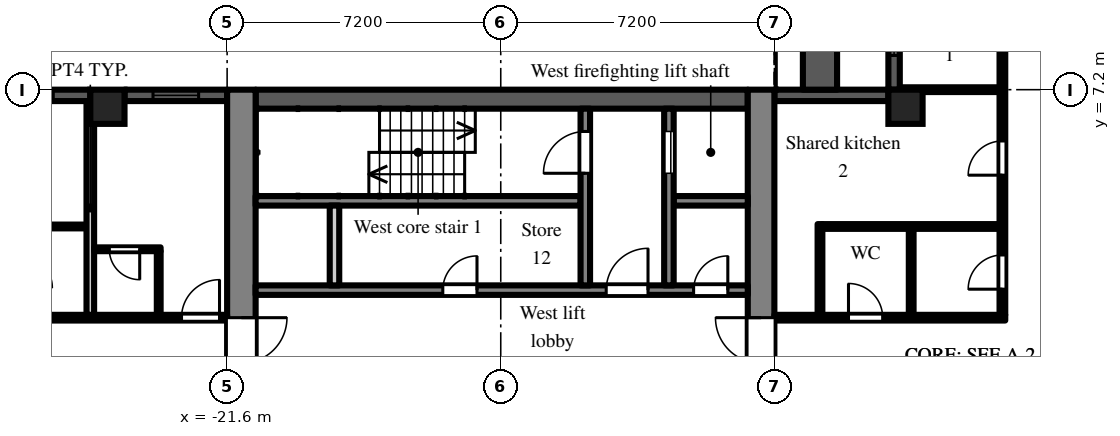
"""IFC4 building model, lengths in metres.
Left out: names, types, materials, properties, quantities, classifications, styles, units other than length and angle.
Written with IfcOpenShell. Run it as: python <this file> out.ifc"""

import sys

from ifc_helpers import new_model, si_unit, direction, frame, frame_2d, origin, origin_2d, place, context, subcontext, project, spatial, rectangle, extrude, element, fill, save


model = new_model("IFC4")
c1 = context("Model", 3, precision=1e-05, world=origin(), true_north=direction((0.0, 1.0)))
c2 = subcontext(c1, "Body", "Model", "MODEL_VIEW")
j1 = project(units=[si_unit("LENGTHUNIT", "METRE"), si_unit("PLANEANGLEUNIT", "RADIAN")], contexts=[c1])
p1 = place(None, origin())
s1 = spatial("IfcSite", under=j1, at=p1, CompositionType="ELEMENT")
p2 = place(p1, origin())
s2 = spatial("IfcBuilding", under=s1, at=p2, CompositionType="ELEMENT")
p3 = place(p2, frame((0.0, 0.0, 69.9)))
s3 = spatial("IfcBuildingStorey", under=s2, at=p3, CompositionType="ELEMENT", Elevation=69.9)
for number, where, z_axis, x_axis in (
    (1, (-24.75, 6.75, 0.0), (0.0, 0.0, 1.0), (1.0, 0.0, 0.0)),
    (2, (-3.75, 6.75, 0.0), (0.0, 0.0, 1.0), (1.0, 0.0, 0.0)),
):
    element("IfcColumn", number, at=place(p3, frame(where, z_axis=z_axis, x_axis=x_axis)), inside=s3, PredefinedType="COLUMN", context=c2, shape_type="SweptSolid", body=[
        extrude(rectangle(XDim=0.9, YDim=0.9, at=origin_2d()), origin(), (0.0, 0.0, 1.0), 3.0),
    ])
p4 = place(p3, frame((-4.05, 14.4, 0.0), z_axis=(0.0, 0.0, 1.0), x_axis=(0.0, -1.0, 0.0)))
e3 = element("IfcWall", 3, at=p4, inside=s3, PredefinedType="SOLIDWALL", context=c2, shape_type="SweptSolid", body=[
    extrude(rectangle(XDim=7.2, YDim=0.3, at=frame_2d((3.6, 0.0))), origin(), (0.0, 0.0, 1.0), 2.1),
])
p5 = place(p4, frame((3.0, 0.0, 0.0)))
e4 = element("IfcOpeningElement", 4, at=p5, cuts=e3, PredefinedType="OPENING", context=c2, shape_type="SweptSolid", body=[
    extrude(rectangle(XDim=1.2, YDim=2.05, at=frame_2d((0.6, 1.025))), frame((0.0, 0.16, 0.0), z_axis=(0.0, -1.0, 0.0), x_axis=(1.0, 0.0, 0.0)), (0.0, 0.0, 1.0), 0.32),
])
p6 = place(p4, frame((0.9, 0.0, 0.2)))
e5 = element("IfcOpeningElement", 5, at=p6, cuts=e3, PredefinedType="OPENING", context=c2, shape_type="SweptSolid", body=[
    extrude(rectangle(XDim=1.8, YDim=1.85, at=frame_2d((0.9, 0.925))), frame((0.0, 0.16, 0.0), z_axis=(0.0, -1.0, 0.0), x_axis=(1.0, 0.0, 0.0)), (0.0, 0.0, 1.0), 0.32),
])
p7 = place(p4, frame((4.5, 0.0, 0.2)))
e6 = element("IfcOpeningElement", 6, at=p7, cuts=e3, PredefinedType="OPENING", context=c2, shape_type="SweptSolid", body=[
    extrude(rectangle(XDim=1.8, YDim=1.85, at=frame_2d((0.9, 0.925))), frame((0.0, 0.16, 0.0), z_axis=(0.0, -1.0, 0.0), x_axis=(1.0, 0.0, 0.0)), (0.0, 0.0, 1.0), 0.32),
])
p8 = place(p3, frame((-4.2, 7.05, 0.0), z_axis=(0.0, 0.0, 1.0), x_axis=(-1.0, 0.0, 0.0)))
e7 = element("IfcWall", 7, at=p8, inside=s3, PredefinedType="SOLIDWALL", context=c2, shape_type="SweptSolid", body=[
    extrude(rectangle(XDim=3.0, YDim=0.3, at=frame_2d((1.5, 0.0))), origin(), (0.0, 0.0, 1.0), 2.1),
])
p9 = place(p3, frame((-21.6, 7.05, 0.0), z_axis=(0.0, 0.0, 1.0), x_axis=(-1.0, 0.0, 0.0)))
e8 = element("IfcWall", 8, at=p9, inside=s3, PredefinedType="SOLIDWALL", context=c2, shape_type="SweptSolid", body=[
    extrude(rectangle(XDim=2.7, YDim=0.3, at=frame_2d((1.35, 0.0))), origin(), (0.0, 0.0, 1.0), 2.1),
])
p10 = place(p9, frame((0.75, 0.0, 0.2)))
e9 = element("IfcOpeningElement", 9, at=p10, cuts=e8, PredefinedType="OPENING", context=c2, shape_type="SweptSolid", body=[
    extrude(rectangle(XDim=1.2, YDim=1.85, at=frame_2d((0.6, 0.925))), frame((0.0, 0.16, 0.0), z_axis=(0.0, -1.0, 0.0), x_axis=(1.0, 0.0, 0.0)), (0.0, 0.0, 1.0), 0.32),
])
p11 = place(p3, frame((-25.2, 7.05, 0.0), z_axis=(0.0, 0.0, 1.0), x_axis=(-1.0, 0.0, 0.0)))
e10 = element("IfcWall", 10, at=p11, inside=s3, PredefinedType="SOLIDWALL", context=c2, shape_type="SweptSolid", body=[
    extrude(rectangle(XDim=3.15, YDim=0.3, at=frame_2d((1.575, 0.0))), origin(), (0.0, 0.0, 1.0), 2.1),
])
p12 = place(p11, frame((0.975, 0.0, 0.2)))
e11 = element("IfcOpeningElement", 11, at=p12, cuts=e10, PredefinedType="OPENING", context=c2, shape_type="SweptSolid", body=[
    extrude(rectangle(XDim=1.2, YDim=1.85, at=frame_2d((0.6, 0.925))), frame((0.0, 0.16, 0.0), z_axis=(0.0, -1.0, 0.0), x_axis=(1.0, 0.0, 0.0)), (0.0, 0.0, 1.0), 0.32),
])
p13 = place(p3, frame((-6.0, 7.2, 0.0), z_axis=(0.0, 0.0, 1.0), x_axis=(0.0, 1.0, 0.0)))
e12 = element("IfcWall", 12, at=p13, inside=s3, PredefinedType="PARAPET", context=c2, shape_type="SweptSolid", body=[
    extrude(rectangle(XDim=7.2, YDim=0.9, at=frame_2d((3.6, 0.0))), origin(), (0.0, 0.0, 1.0), 0.8),
])
p14 = place(p3, frame((-7.55, -7.2, 0.0), z_axis=(0.0, 0.0, 1.0), x_axis=(0.0, 1.0, 0.0)))
e13 = element("IfcWall", 13, at=p14, inside=s3, PredefinedType="SHEAR", context=c2, shape_type="SweptSolid", body=[
    extrude(rectangle(XDim=14.4, YDim=0.7, at=frame_2d((7.2, 0.0))), origin(), (0.0, 0.0, 1.0), 2.575),
])
p15 = place(p14, frame((6.0, 0.0, 0.0)))
e14 = element("IfcOpeningElement", 14, at=p15, cuts=e13, PredefinedType="OPENING", context=c2, shape_type="SweptSolid", body=[
    extrude(rectangle(XDim=2.4, YDim=2.2, at=frame_2d((1.2, 1.1))), frame((0.0, 0.36, 0.0), z_axis=(0.0, -1.0, 0.0), x_axis=(1.0, 0.0, 0.0)), (0.0, 0.0, 1.0), 0.72),
])
p16 = place(p3, frame((-21.225, -7.2, 0.0), z_axis=(0.0, 0.0, 1.0), x_axis=(0.0, 1.0, 0.0)))
e15 = element("IfcWall", 15, at=p16, inside=s3, PredefinedType="SHEAR", context=c2, shape_type="SweptSolid", body=[
    extrude(rectangle(XDim=14.4, YDim=0.75, at=frame_2d((7.2, 0.0))), origin(), (0.0, 0.0, 1.0), 2.575),
])
p17 = place(p16, frame((6.0, 0.0, 0.0)))
e16 = element("IfcOpeningElement", 16, at=p17, cuts=e15, PredefinedType="OPENING", context=c2, shape_type="SweptSolid", body=[
    extrude(rectangle(XDim=2.4, YDim=2.2, at=frame_2d((1.2, 1.1))), frame((0.0, 0.385, 0.0), z_axis=(0.0, -1.0, 0.0), x_axis=(1.0, 0.0, 0.0)), (0.0, 0.0, 1.0), 0.77),
])
p18 = place(p3, frame((-7.9, 6.95, 0.0), z_axis=(0.0, 0.0, 1.0), x_axis=(-1.0, 0.0, 0.0)))
e17 = element("IfcWall", 17, at=p18, inside=s3, PredefinedType="SHEAR", context=c2, shape_type="SweptSolid", body=[
    extrude(rectangle(XDim=12.95, YDim=0.5, at=frame_2d((6.475, 0.0))), origin(), (0.0, 0.0, 1.0), 2.575),
])
p19 = place(p3, frame((-7.9, 1.925, 0.0), z_axis=(0.0, 0.0, 1.0), x_axis=(-1.0, 0.0, 0.0)))
e18 = element("IfcWall", 18, at=p19, inside=s3, PredefinedType="SHEAR", context=c2, shape_type="SweptSolid", body=[
    extrude(rectangle(XDim=12.95, YDim=0.25, at=frame_2d((6.475, 0.0))), origin(), (0.0, 0.0, 1.0), 2.575),
])
p20 = place(p19, frame((0.525, 0.0, 0.0)))
e19 = element("IfcOpeningElement", 19, at=p20, cuts=e18, PredefinedType="OPENING", context=c2, shape_type="SweptSolid", body=[
    extrude(rectangle(XDim=0.9, YDim=2.1, at=frame_2d((0.45, 1.05))), frame((0.0, 0.135, 0.0), z_axis=(0.0, -1.0, 0.0), x_axis=(1.0, 0.0, 0.0)), (0.0, 0.0, 1.0), 0.27),
])
p21 = place(p19, frame((2.625, 0.0, 0.0)))
e20 = element("IfcOpeningElement", 20, at=p21, cuts=e18, PredefinedType="OPENING", context=c2, shape_type="SweptSolid", body=[
    extrude(rectangle(XDim=1.1, YDim=2.1, at=frame_2d((0.55, 1.05))), frame((0.0, 0.135, 0.0), z_axis=(0.0, -1.0, 0.0), x_axis=(1.0, 0.0, 0.0)), (0.0, 0.0, 1.0), 0.27),
])
p22 = place(p19, frame((7.125, 0.0, 0.0)))
e21 = element("IfcOpeningElement", 21, at=p22, cuts=e18, PredefinedType="OPENING", context=c2, shape_type="SweptSolid", body=[
    extrude(rectangle(XDim=0.9, YDim=2.1, at=frame_2d((0.45, 1.05))), frame((0.0, 0.135, 0.0), z_axis=(0.0, -1.0, 0.0), x_axis=(1.0, 0.0, 0.0)), (0.0, 0.0, 1.0), 0.27),
])
p23 = place(p3, frame((-7.9, 4.275, 0.0), z_axis=(0.0, 0.0, 1.0), x_axis=(-1.0, 0.0, 0.0)))
e22 = element("IfcWall", 22, at=p23, inside=s3, PredefinedType="SHEAR", context=c2, shape_type="SweptSolid", body=[
    extrude(rectangle(XDim=1.95, YDim=0.25, at=frame_2d((0.975, 0.0))), origin(), (0.0, 0.0, 1.0), 2.575),
])
p24 = place(p3, frame((-12.3, 4.275, 0.0), z_axis=(0.0, 0.0, 1.0), x_axis=(-1.0, 0.0, 0.0)))
e23 = element("IfcWall", 23, at=p24, inside=s3, PredefinedType="SHEAR", context=c2, shape_type="SweptSolid", body=[
    extrude(rectangle(XDim=8.55, YDim=0.25, at=frame_2d((4.275, 0.0))), origin(), (0.0, 0.0, 1.0), 2.575),
])
p25 = place(p3, frame((-9.975, 2.05, 0.0), z_axis=(0.0, 0.0, 1.0), x_axis=(0.0, 1.0, 0.0)))
e24 = element("IfcWall", 24, at=p25, inside=s3, PredefinedType="SHEAR", context=c2, shape_type="SweptSolid", body=[
    extrude(rectangle(XDim=4.65, YDim=0.25, at=frame_2d((2.325, 0.0))), origin(), (0.0, 0.0, 1.0), 2.575),
])
p26 = place(p25, frame((2.95, 0.0, 0.0)))
e25 = element("IfcOpeningElement", 25, at=p26, cuts=e24, PredefinedType="OPENING", context=c2, shape_type="SweptSolid", body=[
    extrude(rectangle(XDim=1.1, YDim=2.1, at=frame_2d((0.55, 1.05))), frame((0.0, 0.135, 0.0), z_axis=(0.0, -1.0, 0.0), x_axis=(1.0, 0.0, 0.0)), (0.0, 0.0, 1.0), 0.27),
])
p27 = place(p3, frame((-12.175, 2.05, 0.0), z_axis=(0.0, 0.0, 1.0), x_axis=(0.0, 1.0, 0.0)))
e26 = element("IfcWall", 26, at=p27, inside=s3, PredefinedType="SHEAR", context=c2, shape_type="SweptSolid", body=[
    extrude(rectangle(XDim=4.65, YDim=0.25, at=frame_2d((2.325, 0.0))), origin(), (0.0, 0.0, 1.0), 2.575),
])
p28 = place(p27, frame((2.95, 0.0, 0.0)))
e27 = element("IfcOpeningElement", 27, at=p28, cuts=e26, PredefinedType="OPENING", context=c2, shape_type="SweptSolid", body=[
    extrude(rectangle(XDim=1.1, YDim=2.1, at=frame_2d((0.55, 1.05))), frame((0.0, 0.135, 0.0), z_axis=(0.0, -1.0, 0.0), x_axis=(1.0, 0.0, 0.0)), (0.0, 0.0, 1.0), 0.27),
])
p29 = place(p3, frame((-18.775, 2.05, 0.0), z_axis=(0.0, 0.0, 1.0), x_axis=(0.0, 1.0, 0.0)))
e28 = element("IfcWall", 28, at=p29, inside=s3, PredefinedType="PARTITIONING", context=c2, shape_type="SweptSolid", body=[
    extrude(rectangle(XDim=2.1, YDim=0.25, at=frame_2d((1.05, 0.0))), origin(), (0.0, 0.0, 1.0), 2.575),
])
p30 = place(p3, frame((-36.5, 1.2, 0.0), z_axis=(0.0, 0.0, 1.0), x_axis=(1.0, 0.0, 0.0)))
e29 = element("IfcWall", 29, at=p30, inside=s3, PredefinedType="PARTITIONING", context=c2, shape_type="SweptSolid", body=[
    extrude(rectangle(XDim=14.9, YDim=0.15, at=frame_2d((7.45, 0.0))), origin(), (0.0, 0.0, 1.0), 2.575),
])
p31 = place(p30, frame((13.7, 0.0, 0.0)))
e30 = element("IfcOpeningElement", 30, at=p31, cuts=e29, PredefinedType="OPENING", context=c2, shape_type="SweptSolid", body=[
    extrude(rectangle(XDim=1.0, YDim=2.1, at=frame_2d((0.5, 1.05))), frame((0.0, 0.085, 0.0), z_axis=(0.0, -1.0, 0.0), x_axis=(1.0, 0.0, 0.0)), (0.0, 0.0, 1.0), 0.17),
])
p32 = place(p30, frame((8.19, 0.0, 0.0)))
e31 = element("IfcOpeningElement", 31, at=p32, cuts=e29, PredefinedType="OPENING", context=c2, shape_type="SweptSolid", body=[
    extrude(rectangle(XDim=1.0, YDim=2.1, at=frame_2d((0.5, 1.05))), frame((0.0, 0.085, 0.0), z_axis=(0.0, -1.0, 0.0), x_axis=(1.0, 0.0, 0.0)), (0.0, 0.0, 1.0), 0.17),
])
p33 = place(p30, frame((1.15, 0.0, 0.0)))
e32 = element("IfcOpeningElement", 32, at=p33, cuts=e29, PredefinedType="OPENING", context=c2, shape_type="SweptSolid", body=[
    extrude(rectangle(XDim=1.8, YDim=2.1, at=frame_2d((0.9, 1.05))), frame((0.0, 0.085, 0.0), z_axis=(0.0, -1.0, 0.0), x_axis=(1.0, 0.0, 0.0)), (0.0, 0.0, 1.0), 0.17),
])
p34 = place(p3, frame((-26.95, 3.6, 0.0), z_axis=(0.0, 0.0, 1.0), x_axis=(1.0, 0.0, 0.0)))
e33 = element("IfcWall", 33, at=p34, inside=s3, PredefinedType="PARTITIONING", context=c2, shape_type="SweptSolid", body=[
    extrude(rectangle(XDim=1.65, YDim=0.1, at=frame_2d((0.825, 0.0))), origin(), (0.0, 0.0, 1.0), 2.575),
])
p35 = place(p3, frame((-25.2, 1.275, 0.0), z_axis=(0.0, 0.0, 1.0), x_axis=(0.0, 1.0, 0.0)))
e34 = element("IfcWall", 34, at=p35, inside=s3, PredefinedType="PARTITIONING", context=c2, shape_type="SweptSolid", body=[
    extrude(rectangle(XDim=5.625, YDim=0.2, at=frame_2d((2.812, 0.0))), origin(), (0.0, 0.0, 1.0), 2.575),
])
p36 = place(p3, frame((-25.1, 3.0, 0.0), z_axis=(0.0, 0.0, 1.0), x_axis=(1.0, 0.0, 0.0)))
e35 = element("IfcWall", 35, at=p36, inside=s3, PredefinedType="PARTITIONING", context=c2, shape_type="SweptSolid", body=[
    extrude(rectangle(XDim=1.75, YDim=0.1, at=frame_2d((0.875, 0.0))), origin(), (0.0, 0.0, 1.0), 2.575),
])
p37 = place(p36, frame((0.4, 0.0, 0.0)))
e36 = element("IfcOpeningElement", 36, at=p37, cuts=e35, PredefinedType="OPENING", context=c2, shape_type="SweptSolid", body=[
    extrude(rectangle(XDim=0.8, YDim=2.1, at=frame_2d((0.4, 1.05))), frame((0.0, 0.06, 0.0), z_axis=(0.0, -1.0, 0.0), x_axis=(1.0, 0.0, 0.0)), (0.0, 0.0, 1.0), 0.12),
])
p38 = place(p3, frame((-23.4, 1.275, 0.0), z_axis=(0.0, 0.0, 1.0), x_axis=(0.0, 1.0, 0.0)))
e37 = element("IfcWall", 37, at=p38, inside=s3, PredefinedType="PARTITIONING", context=c2, shape_type="SweptSolid", body=[
    extrude(rectangle(XDim=1.675, YDim=0.1, at=frame_2d((0.837, 0.0))), origin(), (0.0, 0.0, 1.0), 2.575),
])
p39 = place(p3, frame((-7.2, 1.2, 0.0), z_axis=(0.0, 0.0, 1.0), x_axis=(1.0, 0.0, 0.0)))
e38 = element("IfcWall", 38, at=p39, inside=s3, PredefinedType="PARTITIONING", context=c2, shape_type="SweptSolid", body=[
    extrude(rectangle(XDim=6.075, YDim=0.15, at=frame_2d((3.038, 0.0))), origin(), (0.0, 0.0, 1.0), 2.575),
])
p40 = place(p39, frame((1.95, 0.0, 0.0)))
e39 = element("IfcOpeningElement", 39, at=p40, cuts=e38, PredefinedType="OPENING", context=c2, shape_type="SweptSolid", body=[
    extrude(rectangle(XDim=0.9, YDim=2.1, at=frame_2d((0.45, 1.05))), frame((0.0, 0.085, 0.0), z_axis=(0.0, -1.0, 0.0), x_axis=(1.0, 0.0, 0.0)), (0.0, 0.0, 1.0), 0.17),
])
p41 = place(p3, frame((-6.0, 1.275, 0.0), z_axis=(0.0, 0.0, 1.0), x_axis=(0.0, 1.0, 0.0)))
e40 = element("IfcWall", 40, at=p41, inside=s3, PredefinedType="PARTITIONING", context=c2, shape_type="SweptSolid", body=[
    extrude(rectangle(XDim=2.388, YDim=0.125, at=frame_2d((1.194, 0.0))), origin(), (0.0, 0.0, 1.0), 2.575),
])
p42 = place(p3, frame((-5.938, 3.6, 0.0), z_axis=(0.0, 0.0, 1.0), x_axis=(1.0, 0.0, 0.0)))
e41 = element("IfcWall", 41, at=p42, inside=s3, PredefinedType="PARTITIONING", context=c2, shape_type="SweptSolid", body=[
    extrude(rectangle(XDim=4.663, YDim=0.125, at=frame_2d((2.331, 0.0))), origin(), (0.0, 0.0, 1.0), 2.575),
])
p43 = place(p3, frame((-3.9, 7.2, 0.0), z_axis=(0.0, 0.0, 1.0), x_axis=(1.0, 0.0, 0.0)))
e42 = element("IfcWall", 42, at=p43, inside=s3, PredefinedType="PARTITIONING", context=c2, shape_type="SweptSolid", body=[
    extrude(rectangle(XDim=2.625, YDim=0.125, at=frame_2d((1.312, 0.0))), origin(), (0.0, 0.0, 1.0), 2.575),
])
p44 = place(p3, frame((-3.6, 1.275, 0.0), z_axis=(0.0, 0.0, 1.0), x_axis=(0.0, 1.0, 0.0)))
e43 = element("IfcWall", 43, at=p44, inside=s3, PredefinedType="PARTITIONING", context=c2, shape_type="SweptSolid", body=[
    extrude(rectangle(XDim=2.263, YDim=0.125, at=frame_2d((1.131, 0.0))), origin(), (0.0, 0.0, 1.0), 2.575),
])
p45 = place(p3, frame((-1.2, 1.275, 0.0), z_axis=(0.0, 0.0, 1.0), x_axis=(0.0, 1.0, 0.0)))
e44 = element("IfcWall", 44, at=p45, inside=s3, PredefinedType="PARTITIONING", context=c2, shape_type="SweptSolid", body=[
    extrude(rectangle(XDim=16.65, YDim=0.15, at=frame_2d((8.325, 0.0))), origin(), (0.0, 0.0, 1.0), 2.575),
])
p46 = place(p45, frame((0.675, 0.0, 0.0)))
e45 = element("IfcOpeningElement", 45, at=p46, cuts=e44, PredefinedType="OPENING", context=c2, shape_type="SweptSolid", body=[
    extrude(rectangle(XDim=0.9, YDim=2.1, at=frame_2d((0.45, 1.05))), frame((0.0, 0.085, 0.0), z_axis=(0.0, -1.0, 0.0), x_axis=(1.0, 0.0, 0.0)), (0.0, 0.0, 1.0), 0.17),
])
p47 = place(p45, frame((3.675, 0.0, 0.0)))
e46 = element("IfcOpeningElement", 46, at=p47, cuts=e44, PredefinedType="OPENING", context=c2, shape_type="SweptSolid", body=[
    extrude(rectangle(XDim=0.9, YDim=2.1, at=frame_2d((0.45, 1.05))), frame((0.0, 0.085, 0.0), z_axis=(0.0, -1.0, 0.0), x_axis=(1.0, 0.0, 0.0)), (0.0, 0.0, 1.0), 0.17),
])
p48 = place(p45, frame((10.875, 0.0, 0.0)))
e47 = element("IfcOpeningElement", 47, at=p48, cuts=e44, PredefinedType="OPENING", context=c2, shape_type="SweptSolid", body=[
    extrude(rectangle(XDim=0.9, YDim=2.1, at=frame_2d((0.45, 1.05))), frame((0.0, 0.085, 0.0), z_axis=(0.0, -1.0, 0.0), x_axis=(1.0, 0.0, 0.0)), (0.0, 0.0, 1.0), 0.17),
])
p49 = place(p45, frame((13.725, 0.0, 0.0)))
e48 = element("IfcOpeningElement", 48, at=p49, cuts=e44, PredefinedType="OPENING", context=c2, shape_type="SweptSolid", body=[
    extrude(rectangle(XDim=1.0, YDim=2.1, at=frame_2d((0.5, 1.05))), frame((0.0, 0.085, 0.0), z_axis=(0.0, -1.0, 0.0), x_axis=(1.0, 0.0, 0.0)), (0.0, 0.0, 1.0), 0.17),
])
p50 = place(p7, origin())
e49 = element("IfcWindow", 49, at=p50, inside=s3, PartitioningType="SINGLE_PANEL", PredefinedType="WINDOW", context=c2, shape_type="SweptSolid", body=[
    extrude(rectangle(XDim=1.8, YDim=1.85, at=frame_2d((0.9, 0.925))), frame((0.0, 0.03, 0.0), z_axis=(0.0, -1.0, 0.0), x_axis=(1.0, 0.0, 0.0)), (0.0, 0.0, 1.0), 0.06),
])
fill(e6, e49)
p51 = place(p10, origin())
e50 = element("IfcWindow", 50, at=p51, inside=s3, PartitioningType="SINGLE_PANEL", PredefinedType="WINDOW", context=c2, shape_type="SweptSolid", body=[
    extrude(rectangle(XDim=1.2, YDim=1.85, at=frame_2d((0.6, 0.925))), frame((0.0, 0.03, 0.0), z_axis=(0.0, -1.0, 0.0), x_axis=(1.0, 0.0, 0.0)), (0.0, 0.0, 1.0), 0.06),
])
fill(e9, e50)
p52 = place(p12, origin())
e51 = element("IfcWindow", 51, at=p52, inside=s3, PartitioningType="SINGLE_PANEL", PredefinedType="WINDOW", context=c2, shape_type="SweptSolid", body=[
    extrude(rectangle(XDim=1.2, YDim=1.85, at=frame_2d((0.6, 0.925))), frame((0.0, 0.03, 0.0), z_axis=(0.0, -1.0, 0.0), x_axis=(1.0, 0.0, 0.0)), (0.0, 0.0, 1.0), 0.06),
])
fill(e11, e51)
p53 = place(p26, origin())
e52 = element("IfcDoor", 52, at=p53, inside=s3, OperationType="SLIDING_TO_LEFT", PredefinedType="DOOR", context=c2, shape_type="SweptSolid", body=[
    extrude(rectangle(XDim=1.1, YDim=2.1, at=frame_2d((0.55, 1.05))), frame((0.0, 0.025, 0.0), z_axis=(0.0, -1.0, 0.0), x_axis=(1.0, 0.0, 0.0)), (0.0, 0.0, 1.0), 0.05),
])
fill(e25, e52)
p54 = place(p28, origin())
e53 = element("IfcDoor", 53, at=p54, inside=s3, OperationType="SINGLE_SWING_LEFT", PredefinedType="DOOR", context=c2, shape_type="SweptSolid", body=[
    extrude(rectangle(XDim=1.1, YDim=2.1, at=frame_2d((0.55, 1.05))), frame((0.0, 0.025, 0.0), z_axis=(0.0, -1.0, 0.0), x_axis=(1.0, 0.0, 0.0)), (0.0, 0.0, 1.0), 0.05),
])
fill(e27, e53)
p55 = place(p20, frame((0.9, 0.0, 0.0), z_axis=(0.0, 0.0, 1.0), x_axis=(-1.0, 0.0, 0.0)))
e54 = element("IfcDoor", 54, at=p55, inside=s3, OperationType="SINGLE_SWING_RIGHT", PredefinedType="DOOR", context=c2, shape_type="SweptSolid", body=[
    extrude(rectangle(XDim=0.9, YDim=2.1, at=frame_2d((0.45, 1.05))), frame((0.0, 0.025, 0.0), z_axis=(0.0, -1.0, 0.0), x_axis=(1.0, 0.0, 0.0)), (0.0, 0.0, 1.0), 0.05),
])
fill(e19, e54)
p56 = place(p21, frame((1.1, 0.0, 0.0), z_axis=(0.0, 0.0, 1.0), x_axis=(-1.0, 0.0, 0.0)))
e55 = element("IfcDoor", 55, at=p56, inside=s3, OperationType="SINGLE_SWING_RIGHT", PredefinedType="DOOR", context=c2, shape_type="SweptSolid", body=[
    extrude(rectangle(XDim=1.1, YDim=2.1, at=frame_2d((0.55, 1.05))), frame((0.0, 0.025, 0.0), z_axis=(0.0, -1.0, 0.0), x_axis=(1.0, 0.0, 0.0)), (0.0, 0.0, 1.0), 0.05),
])
fill(e20, e55)
p57 = place(p15, origin())
e56 = element("IfcDoor", 56, at=p57, inside=s3, OperationType="DOUBLE_DOOR_DOUBLE_SWING", PredefinedType="DOOR", context=c2, shape_type="SweptSolid", body=[
    extrude(rectangle(XDim=2.4, YDim=2.2, at=frame_2d((1.2, 1.1))), frame((0.0, 0.025, 0.0), z_axis=(0.0, -1.0, 0.0), x_axis=(1.0, 0.0, 0.0)), (0.0, 0.0, 1.0), 0.05),
])
fill(e14, e56)
p58 = place(p17, frame((2.4, 0.0, 0.0), z_axis=(0.0, 0.0, 1.0), x_axis=(-1.0, 0.0, 0.0)))
e57 = element("IfcDoor", 57, at=p58, inside=s3, OperationType="DOUBLE_DOOR_DOUBLE_SWING", PredefinedType="DOOR", context=c2, shape_type="SweptSolid", body=[
    extrude(rectangle(XDim=2.4, YDim=2.2, at=frame_2d((1.2, 1.1))), frame((0.0, 0.025, 0.0), z_axis=(0.0, -1.0, 0.0), x_axis=(1.0, 0.0, 0.0)), (0.0, 0.0, 1.0), 0.05),
])
fill(e16, e57)
p59 = place(p22, frame((0.9, 0.0, 0.0), z_axis=(0.0, 0.0, 1.0), x_axis=(-1.0, 0.0, 0.0)))
e58 = element("IfcDoor", 58, at=p59, inside=s3, OperationType="SINGLE_SWING_RIGHT", PredefinedType="DOOR", context=c2, shape_type="SweptSolid", body=[
    extrude(rectangle(XDim=0.9, YDim=2.1, at=frame_2d((0.45, 1.05))), frame((0.0, 0.025, 0.0), z_axis=(0.0, -1.0, 0.0), x_axis=(1.0, 0.0, 0.0)), (0.0, 0.0, 1.0), 0.05),
])
fill(e21, e58)
p60 = place(p46, origin())
e59 = element("IfcDoor", 59, at=p60, inside=s3, OperationType="SINGLE_SWING_LEFT", PredefinedType="DOOR", context=c2, shape_type="SweptSolid", body=[
    extrude(rectangle(XDim=0.9, YDim=2.1, at=frame_2d((0.45, 1.05))), frame((0.0, 0.025, 0.0), z_axis=(0.0, -1.0, 0.0), x_axis=(1.0, 0.0, 0.0)), (0.0, 0.0, 1.0), 0.05),
])
fill(e45, e59)
p61 = place(p40, origin())
e60 = element("IfcDoor", 60, at=p61, inside=s3, OperationType="SINGLE_SWING_LEFT", PredefinedType="DOOR", context=c2, shape_type="SweptSolid", body=[
    extrude(rectangle(XDim=0.9, YDim=2.1, at=frame_2d((0.45, 1.05))), frame((0.0, 0.025, 0.0), z_axis=(0.0, -1.0, 0.0), x_axis=(1.0, 0.0, 0.0)), (0.0, 0.0, 1.0), 0.05),
])
fill(e39, e60)
p62 = place(p47, origin())
e61 = element("IfcDoor", 61, at=p62, inside=s3, OperationType="SINGLE_SWING_LEFT", PredefinedType="DOOR", context=c2, shape_type="SweptSolid", body=[
    extrude(rectangle(XDim=0.9, YDim=2.1, at=frame_2d((0.45, 1.05))), frame((0.0, 0.025, 0.0), z_axis=(0.0, -1.0, 0.0), x_axis=(1.0, 0.0, 0.0)), (0.0, 0.0, 1.0), 0.05),
])
fill(e46, e61)
p63 = place(p37, frame((0.8, 0.0, 0.0), z_axis=(0.0, 0.0, 1.0), x_axis=(-1.0, 0.0, 0.0)))
e62 = element("IfcDoor", 62, at=p63, inside=s3, OperationType="SINGLE_SWING_LEFT", PredefinedType="DOOR", context=c2, shape_type="SweptSolid", body=[
    extrude(rectangle(XDim=0.8, YDim=2.1, at=frame_2d((0.4, 1.05))), frame((0.0, 0.025, 0.0), z_axis=(0.0, -1.0, 0.0), x_axis=(1.0, 0.0, 0.0)), (0.0, 0.0, 1.0), 0.05),
])
fill(e36, e62)
p64 = place(p31, origin())
e63 = element("IfcDoor", 63, at=p64, inside=s3, OperationType="SINGLE_SWING_RIGHT", PredefinedType="DOOR", context=c2, shape_type="SweptSolid", body=[
    extrude(rectangle(XDim=1.0, YDim=2.1, at=frame_2d((0.5, 1.05))), frame((0.0, 0.025, 0.0), z_axis=(0.0, -1.0, 0.0), x_axis=(1.0, 0.0, 0.0)), (0.0, 0.0, 1.0), 0.05),
])
fill(e30, e63)
save(model, sys.argv[1])
